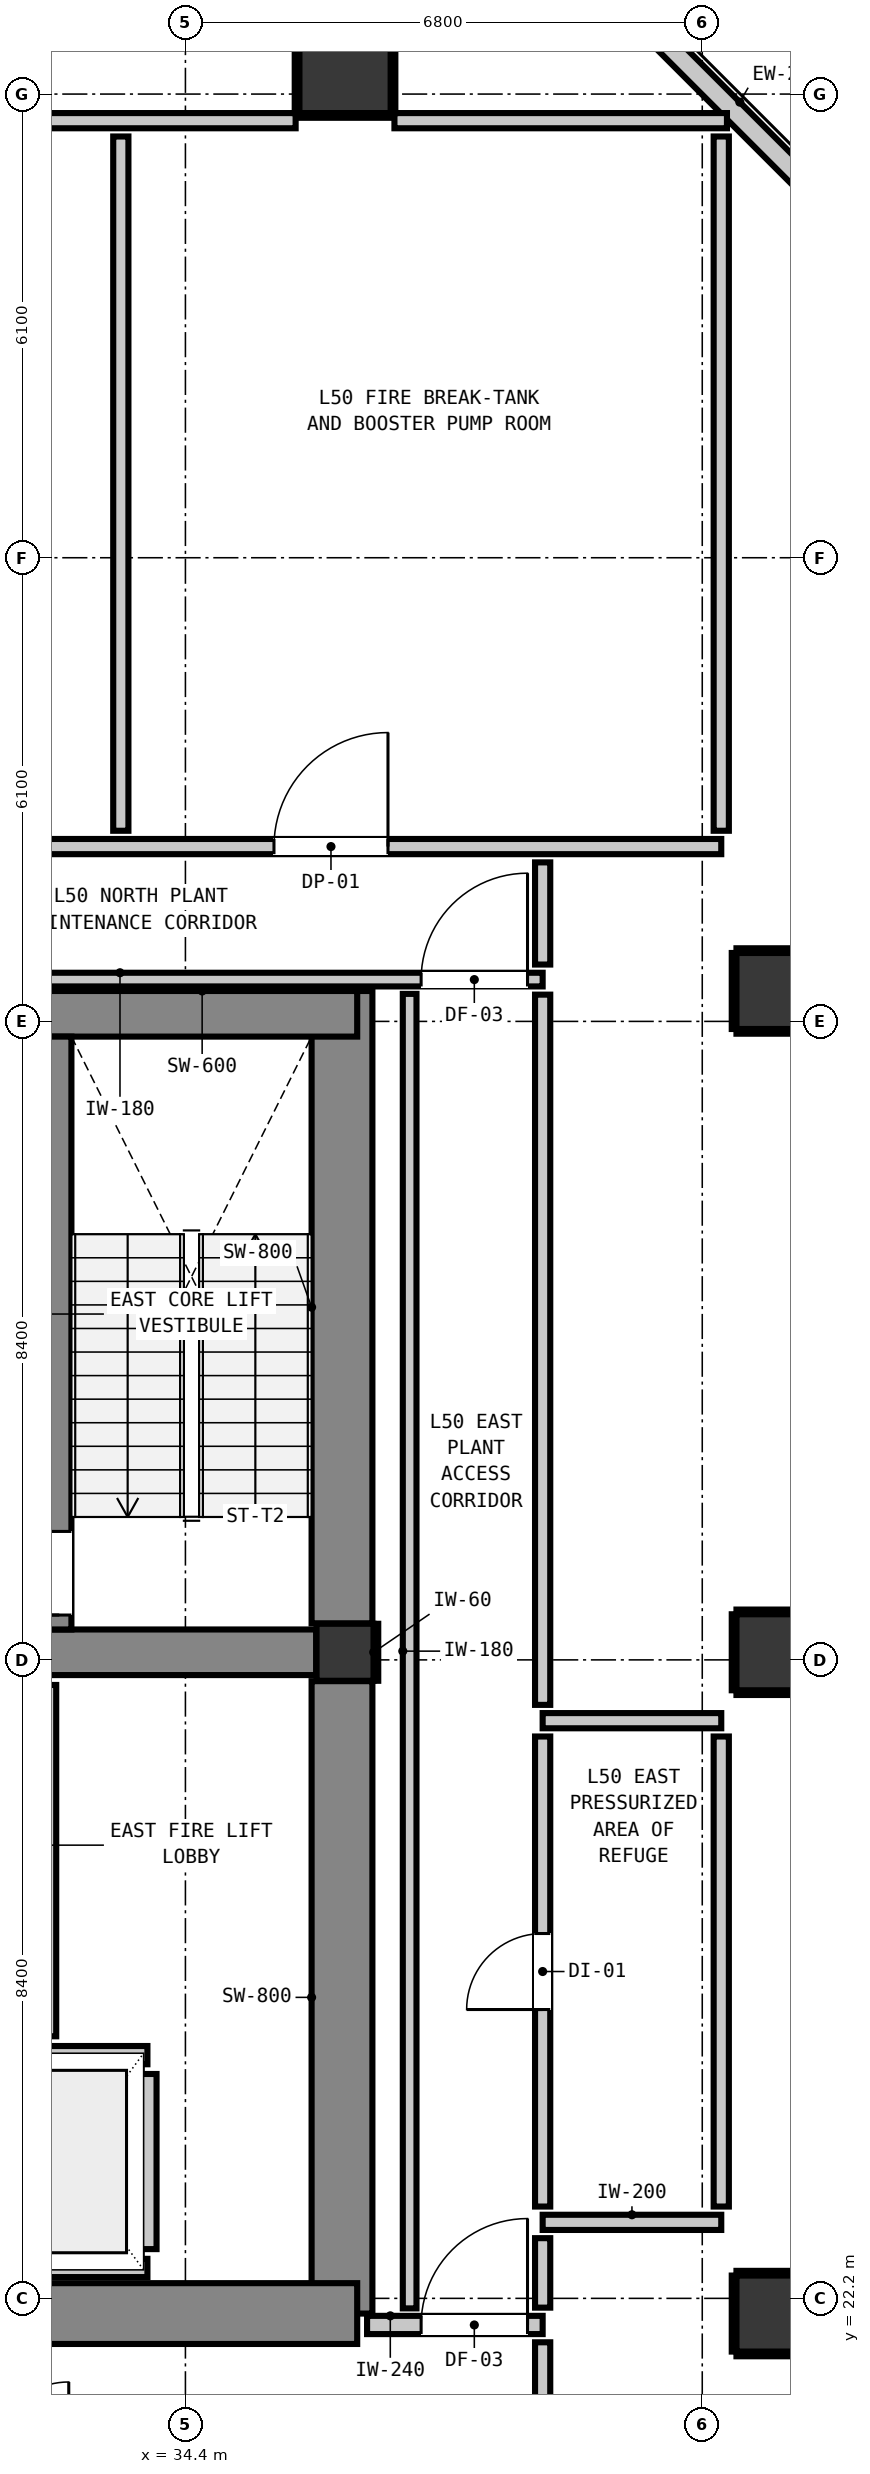
"""IFC4 building model, lengths in metres.
Left out: names, types, materials, properties, quantities, classifications, styles, units other than length and angle.
Written with IfcOpenShell. Run it as: python <this file> out.ifc"""

import sys

from ifc_helpers import new_model, si_unit, direction, frame, frame_2d, origin, origin_2d, place, context, subcontext, project, spatial, rectangle, extrude, element, fill, save


model = new_model("IFC4")
c1 = context("Model", 3, precision=1e-05, world=origin(), true_north=direction((0.0, 1.0)))
c2 = subcontext(c1, "Body", "Model", "MODEL_VIEW")
j1 = project(units=[si_unit("LENGTHUNIT", "METRE"), si_unit("PLANEANGLEUNIT", "RADIAN")], contexts=[c1])
p1 = place(None, origin())
s1 = spatial("IfcSite", under=j1, at=p1, CompositionType="ELEMENT")
p2 = place(p1, origin())
s2 = spatial("IfcBuilding", under=s1, at=p2, CompositionType="ELEMENT")
p3 = place(p2, frame((0.0, 0.0, 172.48)))
s3 = spatial("IfcBuildingStorey", under=s2, at=p3, CompositionType="ELEMENT", Elevation=172.48)
p4 = place(p3, frame((36.5, 30.7, 0.0), z_axis=(0.0, 0.0, 1.0), x_axis=(1.0, 0.0, 0.0)))
e1 = element("IfcColumn", 1, at=p4, inside=s3, PredefinedType="COLUMN", context=c2, shape_type="SweptSolid", body=[
    extrude(rectangle(XDim=0.75, YDim=0.75, at=origin_2d()), origin(), (0.0, 0.0, 1.0), 4.4),
])
p5 = place(p3, frame((36.46, 22.0, 0.0), z_axis=(0.0, 0.0, 1.0), x_axis=(0.0, 1.0, 0.0)))
e2 = element("IfcWall", 2, at=p5, inside=s3, PredefinedType="SHEAR", context=c2, shape_type="SweptSolid", body=[
    extrude(rectangle(XDim=8.32, YDim=0.8, at=frame_2d((4.16, 0.0))), origin(), (0.0, 0.0, 1.0), 4.4),
])
p6 = place(p3, frame((36.46, 31.08, 0.0), z_axis=(0.0, 0.0, 1.0), x_axis=(0.0, 1.0, 0.0)))
e3 = element("IfcWall", 3, at=p6, inside=s3, PredefinedType="SHEAR", context=c2, shape_type="SweptSolid", body=[
    extrude(rectangle(XDim=8.32, YDim=0.8, at=frame_2d((4.16, 0.0))), origin(), (0.0, 0.0, 1.0), 4.4),
])
p7 = place(p3, frame((29.58, 22.0, 0.0), z_axis=(0.0, 0.0, 1.0), x_axis=(1.0, 0.0, 0.0)))
e4 = element("IfcWall", 4, at=p7, inside=s3, PredefinedType="SHEAR", context=c2, shape_type="SweptSolid", body=[
    extrude(rectangle(XDim=7.08, YDim=0.8, at=frame_2d((3.54, 0.0))), origin(), (0.0, 0.0, 1.0), 4.4),
])
p8 = place(p3, frame((32.58, 39.1, 0.0), z_axis=(0.0, 0.0, 1.0), x_axis=(1.0, 0.0, 0.0)))
e5 = element("IfcWall", 5, at=p8, inside=s3, PredefinedType="SHEAR", context=c2, shape_type="SweptSolid", body=[
    extrude(rectangle(XDim=4.08, YDim=0.6, at=frame_2d((2.04, 0.0))), origin(), (0.0, 0.0, 1.0), 4.4),
])
p9 = place(p3, frame((32.58, 30.7, 0.0), z_axis=(0.0, 0.0, 1.0), x_axis=(1.0, 0.0, 0.0)))
e6 = element("IfcWall", 6, at=p9, inside=s3, PredefinedType="SHEAR", context=c2, shape_type="SweptSolid", body=[
    extrude(rectangle(XDim=3.54, YDim=0.6, at=frame_2d((1.77, 0.0))), origin(), (0.0, 0.0, 1.0), 4.4),
])
p10 = place(p3, frame((32.74, 31.0, 0.0), z_axis=(0.0, 0.0, 1.0), x_axis=(0.0, 1.0, 0.0)))
e7 = element("IfcWall", 7, at=p10, inside=s3, PredefinedType="SHEAR", context=c2, shape_type="SweptSolid", body=[
    extrude(rectangle(XDim=7.8, YDim=0.32, at=frame_2d((3.9, 0.0))), origin(), (0.0, 0.0, 1.0), 4.4),
])
p11 = place(p10, frame((0.19, 0.0, 0.0)))
e8 = element("IfcOpeningElement", 8, at=p11, cuts=e7, PredefinedType="OPENING", context=c2, shape_type="SweptSolid", body=[
    extrude(rectangle(XDim=1.1, YDim=2.15, at=frame_2d((0.55, 1.075))), frame((0.0, 0.17, 0.0), z_axis=(0.0, -1.0, 0.0), x_axis=(1.0, 0.0, 0.0)), (0.0, 0.0, 1.0), 0.34),
])
p12 = place(p3, frame((36.5, 51.55, 0.0), z_axis=(0.0, 0.0, 1.0), x_axis=(1.0, 0.0, 0.0)))
e9 = element("IfcColumn", 9, at=p12, inside=s3, PredefinedType="COLUMN", context=c2, shape_type="SweptSolid", body=[
    extrude(rectangle(XDim=1.2, YDim=1.2, at=origin_2d()), origin(), (0.0, 0.0, 1.0), 4.4),
])
for number, where, z_axis, x_axis in (
    (10, (42.15, 22.0, 0.0), (0.0, 0.0, 1.0), (1.0, 0.0, 0.0)),
    (11, (42.15, 30.7, 0.0), (0.0, 0.0, 1.0), (1.0, 0.0, 0.0)),
    (12, (42.15, 39.4, 0.0), (0.0, 0.0, 1.0), (1.0, 0.0, 0.0)),
):
    element("IfcColumn", number, at=place(p3, frame(where, z_axis=z_axis, x_axis=x_axis)), inside=s3, PredefinedType="COLUMN", context=c2, shape_type="SweptSolid", body=[
        extrude(rectangle(XDim=1.0, YDim=1.0, at=origin_2d()), origin(), (0.0, 0.0, 1.0), 4.4),
    ])
p13 = place(p3, frame((40.445, 52.145, 0.0), z_axis=(0.0, 0.0, 1.0), x_axis=(0.707106781187, -0.707106781187, 0.0)))
e13 = element("IfcWall", 13, at=p13, inside=s3, PredefinedType="STANDARD", context=c2, shape_type="SweptSolid", body=[
    extrude(rectangle(XDim=3.253, YDim=0.28, at=frame_2d((1.626, 0.0))), origin(), (0.0, 0.0, 1.0), 4.16),
])
for number, where, z_axis, x_axis in (
    (14, (31.828, 22.6, 0.0), (0.0, 0.0, 1.0), (1.0, 0.0, 0.0)),
    (15, (31.828, 25.4, 0.0), (0.0, 0.0, 1.0), (1.0, 0.0, 0.0)),
):
    element("IfcWall", number, at=place(p3, frame(where, z_axis=z_axis, x_axis=x_axis)), inside=s3, PredefinedType="PARTITIONING", context=c2, shape_type="SweptSolid", body=[
        extrude(rectangle(XDim=2.072, YDim=0.24, at=frame_2d((1.036, 0.0))), origin(), (0.0, 0.0, 1.0), 4.16),
    ])
p14 = place(p3, frame((33.9, 22.848, 0.0), z_axis=(0.0, 0.0, 1.0), x_axis=(0.0, 1.0, 0.0)))
e16 = element("IfcWall", 16, at=p14, inside=s3, PredefinedType="PARTITIONING", context=c2, shape_type="SweptSolid", body=[
    extrude(rectangle(XDim=2.304, YDim=0.24, at=frame_2d((1.152, 0.0))), origin(), (0.0, 0.0, 1.0), 4.16),
])
p15 = place(p3, frame((36.79, 21.85, 0.0), z_axis=(0.0, 0.0, 1.0), x_axis=(1.0, 0.0, 0.0)))
e17 = element("IfcWall", 17, at=p15, inside=s3, PredefinedType="PARTITIONING", context=c2, shape_type="SweptSolid", body=[
    extrude(rectangle(XDim=2.31, YDim=0.24, at=frame_2d((1.155, 0.0))), origin(), (0.0, 0.0, 1.0), 3.842),
])
p16 = place(p15, frame((0.711, 0.0, 0.0)))
e18 = element("IfcOpeningElement", 18, at=p16, cuts=e17, PredefinedType="OPENING", context=c2, shape_type="SweptSolid", body=[
    extrude(rectangle(XDim=1.4, YDim=2.15, at=frame_2d((0.7, 1.075))), frame((0.0, 0.13, 0.0), z_axis=(0.0, -1.0, 0.0), x_axis=(1.0, 0.0, 0.0)), (0.0, 0.0, 1.0), 0.26),
])
for number, where, z_axis, x_axis in (
    (19, (39.1, 23.2, 0.0), (0.0, 0.0, 1.0), (1.0, 0.0, 0.0)),
    (20, (39.1, 29.8, 0.0), (0.0, 0.0, 1.0), (1.0, 0.0, 0.0)),
):
    element("IfcWall", number, at=place(p3, frame(where, z_axis=z_axis, x_axis=x_axis)), inside=s3, PredefinedType="PARTITIONING", context=c2, shape_type="SweptSolid", body=[
        extrude(rectangle(XDim=2.35, YDim=0.2, at=frame_2d((1.175, 0.0))), origin(), (0.0, 0.0, 1.0), 4.16),
    ])
p17 = place(p3, frame((4.35, 41.3, 0.0), z_axis=(0.0, 0.0, 1.0), x_axis=(1.0, 0.0, 0.0)))
e21 = element("IfcWall", 21, at=p17, inside=s3, PredefinedType="PARTITIONING", context=c2, shape_type="SweptSolid", body=[
    extrude(rectangle(XDim=37.1, YDim=0.2, at=frame_2d((18.55, 0.0))), origin(), (0.0, 0.0, 1.0), 4.16),
])
p18 = place(p17, frame((24.5, 0.0, 0.0)))
e22 = element("IfcOpeningElement", 22, at=p18, cuts=e21, PredefinedType="OPENING", context=c2, shape_type="SweptSolid", body=[
    extrude(rectangle(XDim=1.5, YDim=2.15, at=frame_2d((0.75, 1.075))), frame((0.0, 0.11, 0.0), z_axis=(0.0, -1.0, 0.0), x_axis=(1.0, 0.0, 0.0)), (0.0, 0.0, 1.0), 0.22),
])
p19 = place(p17, frame((31.215, 0.0, 0.0)))
e23 = element("IfcOpeningElement", 23, at=p19, cuts=e21, PredefinedType="OPENING", context=c2, shape_type="SweptSolid", body=[
    extrude(rectangle(XDim=1.5, YDim=2.15, at=frame_2d((0.75, 1.075))), frame((0.0, 0.11, 0.0), z_axis=(0.0, -1.0, 0.0), x_axis=(1.0, 0.0, 0.0)), (0.0, 0.0, 1.0), 0.22),
])
p20 = place(p17, frame((12.485, 0.0, 0.0)))
e24 = element("IfcOpeningElement", 24, at=p20, cuts=e21, PredefinedType="OPENING", context=c2, shape_type="SweptSolid", body=[
    extrude(rectangle(XDim=1.5, YDim=2.15, at=frame_2d((0.75, 1.075))), frame((0.0, 0.11, 0.0), z_axis=(0.0, -1.0, 0.0), x_axis=(1.0, 0.0, 0.0)), (0.0, 0.0, 1.0), 0.22),
])
p21 = place(p3, frame((29.85, 50.85, 0.0), z_axis=(0.0, 0.0, 1.0), x_axis=(1.0, 0.0, 0.0)))
e25 = element("IfcWall", 25, at=p21, inside=s3, PredefinedType="PARTITIONING", context=c2, shape_type="SweptSolid", body=[
    extrude(rectangle(XDim=6.0, YDim=0.2, at=frame_2d((3.0, 0.0))), origin(), (0.0, 0.0, 1.0), 4.16),
])
p22 = place(p3, frame((37.15, 50.85, 0.0), z_axis=(0.0, 0.0, 1.0), x_axis=(1.0, 0.0, 0.0)))
e26 = element("IfcWall", 26, at=p22, inside=s3, PredefinedType="PARTITIONING", context=c2, shape_type="SweptSolid", body=[
    extrude(rectangle(XDim=4.375, YDim=0.2, at=frame_2d((2.188, 0.0))), origin(), (0.0, 0.0, 1.0), 4.16),
])
p23 = place(p3, frame((29.677, 39.55, 0.0), z_axis=(0.0, 0.0, 1.0), x_axis=(1.0, 0.0, 0.0)))
e27 = element("IfcWall", 27, at=p23, inside=s3, PredefinedType="PARTITIONING", context=c2, shape_type="SweptSolid", body=[
    extrude(rectangle(XDim=9.423, YDim=0.18, at=frame_2d((4.711, 0.0))), origin(), (0.0, 0.0, 1.0), 3.842),
])
p24 = place(p23, frame((7.824, 0.0, 0.0)))
e28 = element("IfcOpeningElement", 28, at=p24, cuts=e27, PredefinedType="OPENING", context=c2, shape_type="SweptSolid", body=[
    extrude(rectangle(XDim=1.4, YDim=2.15, at=frame_2d((0.7, 1.075))), frame((0.0, 0.1, 0.0), z_axis=(0.0, -1.0, 0.0), x_axis=(1.0, 0.0, 0.0)), (0.0, 0.0, 1.0), 0.2),
])
p25 = place(p3, frame((32.58, 25.648, 0.0), z_axis=(0.0, 0.0, 1.0), x_axis=(0.0, 1.0, 0.0)))
e29 = element("IfcWall", 29, at=p25, inside=s3, PredefinedType="PARTITIONING", context=c2, shape_type="SweptSolid", body=[
    extrude(rectangle(XDim=4.622, YDim=0.24, at=frame_2d((2.311, 0.0))), origin(), (0.0, 0.0, 1.0), 4.16),
])
p26 = place(p3, frame((33.55, 41.508, 0.0), z_axis=(0.0, 0.0, 1.0), x_axis=(0.0, 1.0, 0.0)))
e30 = element("IfcWall", 30, at=p26, inside=s3, PredefinedType="PARTITIONING", context=c2, shape_type="SweptSolid", body=[
    extrude(rectangle(XDim=9.134, YDim=0.2, at=frame_2d((4.567, 0.0))), origin(), (0.0, 0.0, 1.0), 4.16),
])
p27 = place(p3, frame((39.1, 20.308, 0.0), z_axis=(0.0, 0.0, 1.0), x_axis=(0.0, 1.0, 0.0)))
e31 = element("IfcWall", 31, at=p27, inside=s3, PredefinedType="PARTITIONING", context=c2, shape_type="SweptSolid", body=[
    extrude(rectangle(XDim=1.314, YDim=0.2, at=frame_2d((0.657, 0.0))), origin(), (0.0, 0.0, 1.0), 4.16),
])
p28 = place(p3, frame((39.1, 22.078, 0.0), z_axis=(0.0, 0.0, 1.0), x_axis=(0.0, 1.0, 0.0)))
e32 = element("IfcWall", 32, at=p28, inside=s3, PredefinedType="PARTITIONING", context=c2, shape_type="SweptSolid", body=[
    extrude(rectangle(XDim=0.914, YDim=0.2, at=frame_2d((0.457, 0.0))), origin(), (0.0, 0.0, 1.0), 4.16),
])
p29 = place(p3, frame((39.1, 23.408, 0.0), z_axis=(0.0, 0.0, 1.0), x_axis=(0.0, 1.0, 0.0)))
e33 = element("IfcWall", 33, at=p29, inside=s3, PredefinedType="PARTITIONING", context=c2, shape_type="SweptSolid", body=[
    extrude(rectangle(XDim=6.184, YDim=0.2, at=frame_2d((3.092, 0.0))), origin(), (0.0, 0.0, 1.0), 4.16),
])
p30 = place(p29, frame((2.592, 0.0, 0.0)))
e34 = element("IfcOpeningElement", 34, at=p30, cuts=e33, PredefinedType="OPENING", context=c2, shape_type="SweptSolid", body=[
    extrude(rectangle(XDim=1.0, YDim=2.15, at=frame_2d((0.5, 1.075))), frame((0.0, 0.11, 0.0), z_axis=(0.0, -1.0, 0.0), x_axis=(1.0, 0.0, 0.0)), (0.0, 0.0, 1.0), 0.22),
])
p31 = place(p3, frame((39.1, 30.008, 0.0), z_axis=(0.0, 0.0, 1.0), x_axis=(0.0, 1.0, 0.0)))
e35 = element("IfcWall", 35, at=p31, inside=s3, PredefinedType="PARTITIONING", context=c2, shape_type="SweptSolid", body=[
    extrude(rectangle(XDim=9.344, YDim=0.2, at=frame_2d((4.672, 0.0))), origin(), (0.0, 0.0, 1.0), 4.16),
])
p32 = place(p3, frame((39.1, 39.748, 0.0), z_axis=(0.0, 0.0, 1.0), x_axis=(0.0, 1.0, 0.0)))
e36 = element("IfcWall", 36, at=p32, inside=s3, PredefinedType="PARTITIONING", context=c2, shape_type="SweptSolid", body=[
    extrude(rectangle(XDim=1.344, YDim=0.2, at=frame_2d((0.672, 0.0))), origin(), (0.0, 0.0, 1.0), 4.16),
])
p33 = place(p3, frame((41.45, 23.408, 0.0), z_axis=(0.0, 0.0, 1.0), x_axis=(0.0, 1.0, 0.0)))
e37 = element("IfcWall", 37, at=p33, inside=s3, PredefinedType="PARTITIONING", context=c2, shape_type="SweptSolid", body=[
    extrude(rectangle(XDim=6.184, YDim=0.2, at=frame_2d((3.092, 0.0))), origin(), (0.0, 0.0, 1.0), 4.16),
])
p34 = place(p3, frame((41.45, 41.508, 0.0), z_axis=(0.0, 0.0, 1.0), x_axis=(0.0, 1.0, 0.0)))
e38 = element("IfcWall", 38, at=p34, inside=s3, PredefinedType="PARTITIONING", context=c2, shape_type="SweptSolid", body=[
    extrude(rectangle(XDim=9.134, YDim=0.2, at=frame_2d((4.567, 0.0))), origin(), (0.0, 0.0, 1.0), 3.645),
])
p35 = place(p3, frame((37.35, 22.068, 0.0), z_axis=(0.0, 0.0, 1.0), x_axis=(0.0, 1.0, 0.0)))
e39 = element("IfcWall", 39, at=p35, inside=s3, PredefinedType="PARTITIONING", context=c2, shape_type="SweptSolid", body=[
    extrude(rectangle(XDim=17.294, YDim=0.18, at=frame_2d((8.647, 0.0))), origin(), (0.0, 0.0, 1.0), 4.16),
])
p36 = place(p3, frame((36.907, 30.325, 0.0), z_axis=(0.0, 0.0, 1.0), x_axis=(0.0, 1.0, 0.0)))
e40 = element("IfcWall", 40, at=p36, inside=s3, PredefinedType="PARTITIONING", context=c2, shape_type="SweptSolid", body=[
    extrude(rectangle(XDim=0.75, YDim=0.06, at=frame_2d((0.375, 0.0))), origin(), (0.0, 0.0, 1.0), 1.45),
])
p37 = place(p3, frame((35.9, 50.918, 0.0), z_axis=(0.0, 0.0, 1.0), x_axis=(1.0, 0.0, 0.0)))
e41 = element("IfcWall", 41, at=p37, inside=s3, PredefinedType="PARTITIONING", context=c2, shape_type="SweptSolid", body=[
    extrude(rectangle(XDim=1.2, YDim=0.06, at=frame_2d((0.6, 0.0))), origin(), (0.0, 0.0, 1.0), 1.45),
])
for number, where, z_axis, x_axis in (
    (42, (35.868, 50.95, 0.0), (0.0, 0.0, 1.0), (0.0, 1.0, 0.0)),
    (43, (37.132, 50.95, 0.0), (0.0, 0.0, 1.0), (0.0, 1.0, 0.0)),
):
    element("IfcWall", number, at=place(p3, frame(where, z_axis=z_axis, x_axis=x_axis)), inside=s3, PredefinedType="PARTITIONING", context=c2, shape_type="SweptSolid", body=[
        extrude(rectangle(XDim=1.04, YDim=0.06, at=frame_2d((0.52, 0.0))), origin(), (0.0, 0.0, 1.0), 1.45),
    ])
for number, where, z_axis, x_axis in (
    (44, (41.65, 21.468, 0.0), (0.0, 0.0, 1.0), (1.0, 0.0, 0.0)),
    (45, (41.65, 22.532, 0.0), (0.0, 0.0, 1.0), (1.0, 0.0, 0.0)),
):
    element("IfcWall", number, at=place(p3, frame(where, z_axis=z_axis, x_axis=x_axis)), inside=s3, PredefinedType="PARTITIONING", context=c2, shape_type="SweptSolid", body=[
        extrude(rectangle(XDim=0.94, YDim=0.06, at=frame_2d((0.47, 0.0))), origin(), (0.0, 0.0, 1.0), 1.45),
    ])
p38 = place(p3, frame((41.618, 21.5, 0.0), z_axis=(0.0, 0.0, 1.0), x_axis=(0.0, 1.0, 0.0)))
e46 = element("IfcWall", 46, at=p38, inside=s3, PredefinedType="PARTITIONING", context=c2, shape_type="SweptSolid", body=[
    extrude(rectangle(XDim=1.0, YDim=0.06, at=frame_2d((0.5, 0.0))), origin(), (0.0, 0.0, 1.0), 1.45),
])
for number, where, z_axis, x_axis in (
    (47, (41.65, 30.168, 0.0), (0.0, 0.0, 1.0), (1.0, 0.0, 0.0)),
    (48, (41.65, 31.232, 0.0), (0.0, 0.0, 1.0), (1.0, 0.0, 0.0)),
):
    element("IfcWall", number, at=place(p3, frame(where, z_axis=z_axis, x_axis=x_axis)), inside=s3, PredefinedType="PARTITIONING", context=c2, shape_type="SweptSolid", body=[
        extrude(rectangle(XDim=0.94, YDim=0.06, at=frame_2d((0.47, 0.0))), origin(), (0.0, 0.0, 1.0), 1.45),
    ])
p39 = place(p3, frame((41.618, 30.2, 0.0), z_axis=(0.0, 0.0, 1.0), x_axis=(0.0, 1.0, 0.0)))
e49 = element("IfcWall", 49, at=p39, inside=s3, PredefinedType="PARTITIONING", context=c2, shape_type="SweptSolid", body=[
    extrude(rectangle(XDim=1.0, YDim=0.06, at=frame_2d((0.5, 0.0))), origin(), (0.0, 0.0, 1.0), 1.45),
])
for number, where, z_axis, x_axis in (
    (50, (41.65, 38.868, 0.0), (0.0, 0.0, 1.0), (1.0, 0.0, 0.0)),
    (51, (41.65, 39.932, 0.0), (0.0, 0.0, 1.0), (1.0, 0.0, 0.0)),
):
    element("IfcWall", number, at=place(p3, frame(where, z_axis=z_axis, x_axis=x_axis)), inside=s3, PredefinedType="PARTITIONING", context=c2, shape_type="SweptSolid", body=[
        extrude(rectangle(XDim=0.94, YDim=0.06, at=frame_2d((0.47, 0.0))), origin(), (0.0, 0.0, 1.0), 1.45),
    ])
p40 = place(p3, frame((41.618, 38.9, 0.0), z_axis=(0.0, 0.0, 1.0), x_axis=(0.0, 1.0, 0.0)))
e52 = element("IfcWall", 52, at=p40, inside=s3, PredefinedType="PARTITIONING", context=c2, shape_type="SweptSolid", body=[
    extrude(rectangle(XDim=1.0, YDim=0.06, at=frame_2d((0.5, 0.0))), origin(), (0.0, 0.0, 1.0), 1.45),
])
p41 = place(p11, origin())
e53 = element("IfcDoor", 53, at=p41, inside=s3, OperationType="SINGLE_SWING_LEFT", PredefinedType="DOOR", context=c2, shape_type="SweptSolid", body=[
    extrude(rectangle(XDim=1.1, YDim=2.15, at=frame_2d((0.55, 1.075))), frame((0.0, 0.025, 0.0), z_axis=(0.0, -1.0, 0.0), x_axis=(1.0, 0.0, 0.0)), (0.0, 0.0, 1.0), 0.05),
])
fill(e8, e53)
p42 = place(p16, origin())
e54 = element("IfcDoor", 54, at=p42, inside=s3, OperationType="SINGLE_SWING_RIGHT", PredefinedType="DOOR", context=c2, shape_type="SweptSolid", body=[
    extrude(rectangle(XDim=1.4, YDim=2.15, at=frame_2d((0.7, 1.075))), frame((0.0, 0.025, 0.0), z_axis=(0.0, -1.0, 0.0), x_axis=(1.0, 0.0, 0.0)), (0.0, 0.0, 1.0), 0.05),
])
fill(e18, e54)
p43 = place(p24, origin())
e55 = element("IfcDoor", 55, at=p43, inside=s3, OperationType="SINGLE_SWING_RIGHT", PredefinedType="DOOR", context=c2, shape_type="SweptSolid", body=[
    extrude(rectangle(XDim=1.4, YDim=2.15, at=frame_2d((0.7, 1.075))), frame((0.0, 0.025, 0.0), z_axis=(0.0, -1.0, 0.0), x_axis=(1.0, 0.0, 0.0)), (0.0, 0.0, 1.0), 0.05),
])
fill(e28, e55)
p44 = place(p30, origin())
e56 = element("IfcDoor", 56, at=p44, inside=s3, OperationType="SINGLE_SWING_LEFT", PredefinedType="DOOR", context=c2, shape_type="SweptSolid", body=[
    extrude(rectangle(XDim=1.0, YDim=2.15, at=frame_2d((0.5, 1.075))), frame((0.0, 0.025, 0.0), z_axis=(0.0, -1.0, 0.0), x_axis=(1.0, 0.0, 0.0)), (0.0, 0.0, 1.0), 0.05),
])
fill(e34, e56)
p45 = place(p19, origin())
e57 = element("IfcDoor", 57, at=p45, inside=s3, OperationType="SINGLE_SWING_RIGHT", PredefinedType="DOOR", context=c2, shape_type="SweptSolid", body=[
    extrude(rectangle(XDim=1.5, YDim=2.15, at=frame_2d((0.75, 1.075))), frame((0.0, 0.025, 0.0), z_axis=(0.0, -1.0, 0.0), x_axis=(1.0, 0.0, 0.0)), (0.0, 0.0, 1.0), 0.05),
])
fill(e23, e57)
save(model, sys.argv[1])
